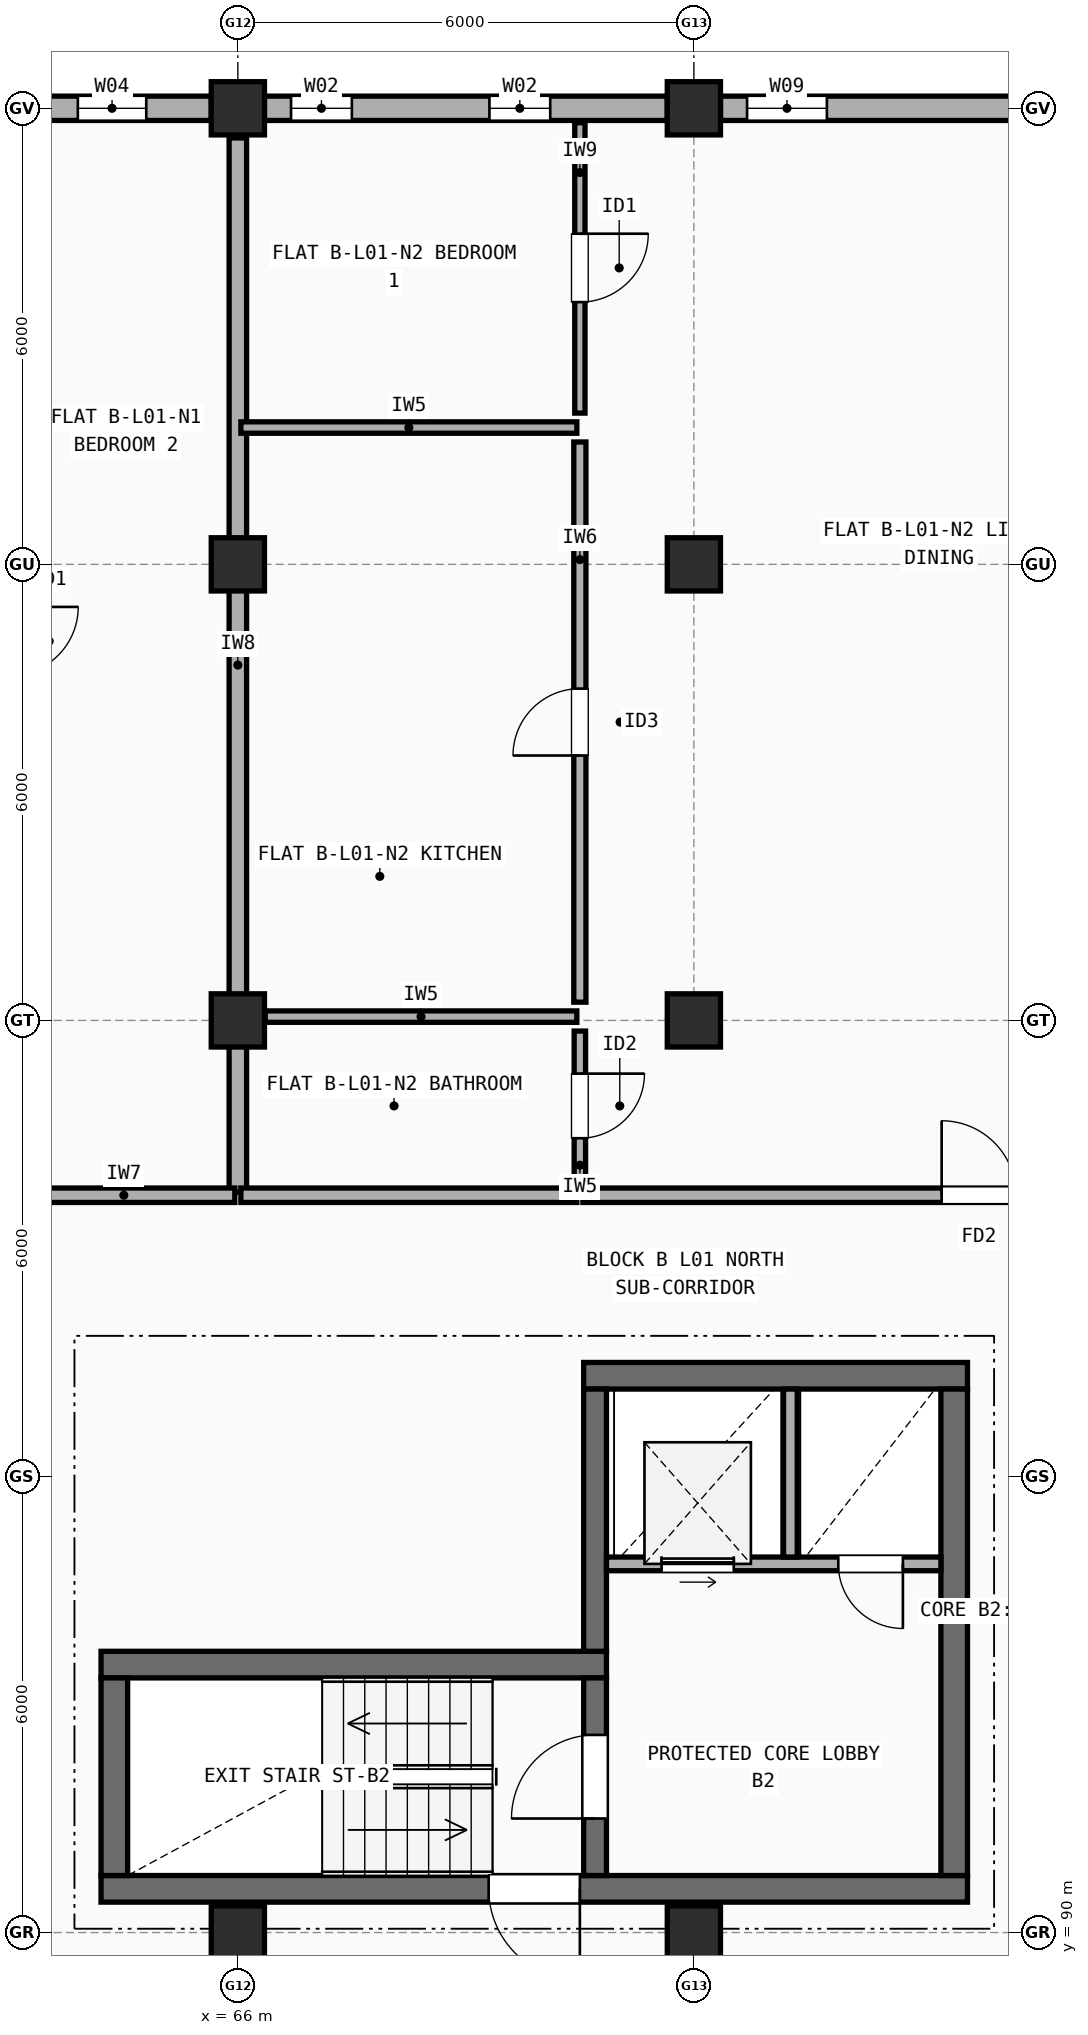
"""IFC4 building model, lengths in metres.
Left out: names, types, materials, properties, quantities, classifications, styles, units other than length and angle.
Written with IfcOpenShell. Run it as: python <this file> out.ifc"""

import sys

from ifc_helpers import new_model, si_unit, direction, frame, frame_2d, origin, origin_2d, place, context, subcontext, project, spatial, rectangle, extrude, element, fill, save


model = new_model("IFC4")
c1 = context("Model", 3, precision=1e-05, world=origin(), true_north=direction((0.0, 1.0)))
c2 = subcontext(c1, "Body", "Model", "MODEL_VIEW")
j1 = project(units=[si_unit("LENGTHUNIT", "METRE"), si_unit("PLANEANGLEUNIT", "RADIAN")], contexts=[c1])
p1 = place(None, origin())
s1 = spatial("IfcSite", under=j1, at=p1, CompositionType="ELEMENT")
p2 = place(p1, origin())
s2 = spatial("IfcBuilding", under=s1, at=p2, CompositionType="ELEMENT")
p3 = place(p2, frame((0.0, 0.0, 4.5)))
s3 = spatial("IfcBuildingStorey", under=s2, at=p3, CompositionType="ELEMENT", Elevation=4.5)
for number, where, z_axis, x_axis in (
    (1, (66.0, 90.0, 0.0), (0.0, 0.0, 1.0), (1.0, 0.0, 0.0)),
    (2, (66.0, 102.0, 0.0), (0.0, 0.0, 1.0), (1.0, 0.0, 0.0)),
    (3, (66.0, 108.0, 0.0), (0.0, 0.0, 1.0), (1.0, 0.0, 0.0)),
    (4, (66.0, 114.0, 0.0), (0.0, 0.0, 1.0), (1.0, 0.0, 0.0)),
    (5, (72.0, 90.0, 0.0), (0.0, 0.0, 1.0), (1.0, 0.0, 0.0)),
    (6, (72.0, 102.0, 0.0), (0.0, 0.0, 1.0), (1.0, 0.0, 0.0)),
    (7, (72.0, 108.0, 0.0), (0.0, 0.0, 1.0), (1.0, 0.0, 0.0)),
    (8, (72.0, 114.0, 0.0), (0.0, 0.0, 1.0), (1.0, 0.0, 0.0)),
):
    element("IfcColumn", number, at=place(p3, frame(where, z_axis=z_axis, x_axis=x_axis)), inside=s3, PredefinedType="COLUMN", context=c2, shape_type="SweptSolid", body=[
        extrude(rectangle(XDim=0.7, YDim=0.7, at=origin_2d()), origin(), (0.0, 0.0, 1.0), 2.945),
    ])
p4 = place(p3, frame((77.7, 114.0, 0.0), z_axis=(0.0, 0.0, 1.0), x_axis=(-1.0, 0.0, 0.0)))
e9 = element("IfcWall", 9, at=p4, inside=s3, PredefinedType="STANDARD", context=c2, shape_type="SweptSolid", body=[
    extrude(rectangle(XDim=5.35, YDim=0.32, at=frame_2d((2.675, 0.0))), origin(), (0.0, 0.0, 1.0), 2.427),
])
p5 = place(p4, frame((0.35, 0.0, 0.9)))
e10 = element("IfcOpeningElement", 10, at=p5, cuts=e9, PredefinedType="OPENING", context=c2, shape_type="SweptSolid", body=[
    extrude(rectangle(XDim=1.05, YDim=1.35, at=frame_2d((0.525, 0.675))), frame((0.0, 0.17, 0.0), z_axis=(0.0, -1.0, 0.0), x_axis=(1.0, 0.0, 0.0)), (0.0, 0.0, 1.0), 0.34),
])
p6 = place(p4, frame((3.95, 0.0, 0.9)))
e11 = element("IfcOpeningElement", 11, at=p6, cuts=e9, PredefinedType="OPENING", context=c2, shape_type="SweptSolid", body=[
    extrude(rectangle(XDim=1.05, YDim=1.35, at=frame_2d((0.525, 0.675))), frame((0.0, 0.17, 0.0), z_axis=(0.0, -1.0, 0.0), x_axis=(1.0, 0.0, 0.0)), (0.0, 0.0, 1.0), 0.34),
])
p7 = place(p3, frame((71.65, 114.0, 0.0), z_axis=(0.0, 0.0, 1.0), x_axis=(-1.0, 0.0, 0.0)))
e12 = element("IfcWall", 12, at=p7, inside=s3, PredefinedType="STANDARD", context=c2, shape_type="SweptSolid", body=[
    extrude(rectangle(XDim=5.3, YDim=0.32, at=frame_2d((2.65, 0.0))), origin(), (0.0, 0.0, 1.0), 2.427),
])
p8 = place(p7, frame((1.54, 0.0, 0.9)))
e13 = element("IfcOpeningElement", 13, at=p8, cuts=e12, PredefinedType="OPENING", context=c2, shape_type="SweptSolid", body=[
    extrude(rectangle(XDim=0.8, YDim=1.2, at=frame_2d((0.4, 0.6))), frame((0.0, 0.17, 0.0), z_axis=(0.0, -1.0, 0.0), x_axis=(1.0, 0.0, 0.0)), (0.0, 0.0, 1.0), 0.34),
])
p9 = place(p7, frame((4.15, 0.0, 0.9)))
e14 = element("IfcOpeningElement", 14, at=p9, cuts=e12, PredefinedType="OPENING", context=c2, shape_type="SweptSolid", body=[
    extrude(rectangle(XDim=0.8, YDim=1.2, at=frame_2d((0.4, 0.6))), frame((0.0, 0.17, 0.0), z_axis=(0.0, -1.0, 0.0), x_axis=(1.0, 0.0, 0.0)), (0.0, 0.0, 1.0), 0.34),
])
p10 = place(p3, frame((65.65, 114.0, 0.0), z_axis=(0.0, 0.0, 1.0), x_axis=(-1.0, 0.0, 0.0)))
e15 = element("IfcWall", 15, at=p10, inside=s3, PredefinedType="STANDARD", context=c2, shape_type="SweptSolid", body=[
    extrude(rectangle(XDim=5.3, YDim=0.32, at=frame_2d((2.65, 0.0))), origin(), (0.0, 0.0, 1.0), 2.427),
])
p11 = place(p10, frame((0.855, 0.0, 0.9)))
e16 = element("IfcOpeningElement", 16, at=p11, cuts=e15, PredefinedType="OPENING", context=c2, shape_type="SweptSolid", body=[
    extrude(rectangle(XDim=0.9, YDim=1.3, at=frame_2d((0.45, 0.65))), frame((0.0, 0.17, 0.0), z_axis=(0.0, -1.0, 0.0), x_axis=(1.0, 0.0, 0.0)), (0.0, 0.0, 1.0), 0.34),
])
p12 = place(p10, frame((3.52, 0.0, 0.9)))
e17 = element("IfcOpeningElement", 17, at=p12, cuts=e15, PredefinedType="OPENING", context=c2, shape_type="SweptSolid", body=[
    extrude(rectangle(XDim=0.95, YDim=1.35, at=frame_2d((0.475, 0.675))), frame((0.0, 0.17, 0.0), z_axis=(0.0, -1.0, 0.0), x_axis=(1.0, 0.0, 0.0)), (0.0, 0.0, 1.0), 0.34),
])
p13 = place(p3, frame((64.2, 90.575, 0.0), z_axis=(0.0, 0.0, 1.0), x_axis=(1.0, 0.0, 0.0)))
e18 = element("IfcWall", 18, at=p13, inside=s3, PredefinedType="SHEAR", context=c2, shape_type="SweptSolid", body=[
    extrude(rectangle(XDim=11.4, YDim=0.35, at=frame_2d((5.7, 0.0))), origin(), (0.0, 0.0, 1.0), 2.945),
])
p14 = place(p13, frame((5.1, 0.0, 0.0)))
e19 = element("IfcOpeningElement", 19, at=p14, cuts=e18, PredefinedType="OPENING", context=c2, shape_type="SweptSolid", body=[
    extrude(rectangle(XDim=1.2, YDim=2.15, at=frame_2d((0.6, 1.075))), frame((0.0, 0.185, 0.0), z_axis=(0.0, -1.0, 0.0), x_axis=(1.0, 0.0, 0.0)), (0.0, 0.0, 1.0), 0.37),
])
p15 = place(p3, frame((70.85, 93.525, 0.0), z_axis=(0.0, 0.0, 1.0), x_axis=(-1.0, 0.0, 0.0)))
e20 = element("IfcWall", 20, at=p15, inside=s3, PredefinedType="SHEAR", context=c2, shape_type="SweptSolid", body=[
    extrude(rectangle(XDim=6.65, YDim=0.35, at=frame_2d((3.325, 0.0))), origin(), (0.0, 0.0, 1.0), 2.945),
])
p16 = place(p3, frame((64.375, 93.35, 0.0), z_axis=(0.0, 0.0, 1.0), x_axis=(0.0, -1.0, 0.0)))
e21 = element("IfcWall", 21, at=p16, inside=s3, PredefinedType="SHEAR", context=c2, shape_type="SweptSolid", body=[
    extrude(rectangle(XDim=2.6, YDim=0.35, at=frame_2d((1.3, 0.0))), origin(), (0.0, 0.0, 1.0), 2.945),
])
p17 = place(p3, frame((70.7, 90.75, 0.0), z_axis=(0.0, 0.0, 1.0), x_axis=(0.0, 1.0, 0.0)))
e22 = element("IfcWall", 22, at=p17, inside=s3, PredefinedType="SHEAR", context=c2, shape_type="SweptSolid", body=[
    extrude(rectangle(XDim=2.6, YDim=0.3, at=frame_2d((1.3, 0.0))), origin(), (0.0, 0.0, 1.0), 2.945),
])
p18 = place(p17, frame((0.75, 0.0, 0.0)))
e23 = element("IfcOpeningElement", 23, at=p18, cuts=e22, PredefinedType="OPENING", context=c2, shape_type="SweptSolid", body=[
    extrude(rectangle(XDim=1.1, YDim=2.15, at=frame_2d((0.55, 1.075))), frame((0.0, 0.16, 0.0), z_axis=(0.0, -1.0, 0.0), x_axis=(1.0, 0.0, 0.0)), (0.0, 0.0, 1.0), 0.32),
])
p19 = place(p3, frame((75.6, 97.325, 0.0), z_axis=(0.0, 0.0, 1.0), x_axis=(-1.0, 0.0, 0.0)))
e24 = element("IfcWall", 24, at=p19, inside=s3, PredefinedType="SHEAR", context=c2, shape_type="SweptSolid", body=[
    extrude(rectangle(XDim=5.05, YDim=0.35, at=frame_2d((2.525, 0.0))), origin(), (0.0, 0.0, 1.0), 2.945),
])
p20 = place(p3, frame((75.425, 90.75, 0.0), z_axis=(0.0, 0.0, 1.0), x_axis=(0.0, 1.0, 0.0)))
e25 = element("IfcWall", 25, at=p20, inside=s3, PredefinedType="SHEAR", context=c2, shape_type="SweptSolid", body=[
    extrude(rectangle(XDim=6.4, YDim=0.35, at=frame_2d((3.2, 0.0))), origin(), (0.0, 0.0, 1.0), 2.945),
])
p21 = place(p3, frame((70.7, 93.7, 0.0), z_axis=(0.0, 0.0, 1.0), x_axis=(0.0, 1.0, 0.0)))
e26 = element("IfcWall", 26, at=p21, inside=s3, PredefinedType="SHEAR", context=c2, shape_type="SweptSolid", body=[
    extrude(rectangle(XDim=3.45, YDim=0.3, at=frame_2d((1.725, 0.0))), origin(), (0.0, 0.0, 1.0), 2.945),
])
p22 = place(p3, frame((70.85, 94.85, 0.0), z_axis=(0.0, 0.0, 1.0), x_axis=(1.0, 0.0, 0.0)))
e27 = element("IfcWall", 27, at=p22, inside=s3, PredefinedType="SOLIDWALL", context=c2, shape_type="SweptSolid", body=[
    extrude(rectangle(XDim=4.4, YDim=0.18, at=frame_2d((2.2, 0.0))), origin(), (0.0, 0.0, 1.0), 2.945),
])
p23 = place(p22, frame((0.725, 0.0, 0.0)))
e28 = element("IfcOpeningElement", 28, at=p23, cuts=e27, PredefinedType="OPENING", context=c2, shape_type="SweptSolid", body=[
    extrude(rectangle(XDim=0.95, YDim=2.15, at=frame_2d((0.475, 1.075))), frame((0.0, 0.1, 0.0), z_axis=(0.0, -1.0, 0.0), x_axis=(1.0, 0.0, 0.0)), (0.0, 0.0, 1.0), 0.2),
])
p24 = place(p22, frame((3.05, 0.0, 0.0)))
e29 = element("IfcOpeningElement", 29, at=p24, cuts=e27, PredefinedType="OPENING", context=c2, shape_type="SweptSolid", body=[
    extrude(rectangle(XDim=0.85, YDim=2.1, at=frame_2d((0.425, 1.05))), frame((0.0, 0.1, 0.0), z_axis=(0.0, -1.0, 0.0), x_axis=(1.0, 0.0, 0.0)), (0.0, 0.0, 1.0), 0.2),
])
p25 = place(p3, frame((73.27, 94.94, 0.0), z_axis=(0.0, 0.0, 1.0), x_axis=(0.0, 1.0, 0.0)))
e30 = element("IfcWall", 30, at=p25, inside=s3, PredefinedType="SOLIDWALL", context=c2, shape_type="SweptSolid", body=[
    extrude(rectangle(XDim=2.21, YDim=0.18, at=frame_2d((1.105, 0.0))), origin(), (0.0, 0.0, 1.0), 2.945),
])
p26 = place(p3, frame((66.0, 99.74, 0.0), z_axis=(0.0, 0.0, 1.0), x_axis=(0.0, 1.0, 0.0)))
e31 = element("IfcWall", 31, at=p26, inside=s3, PredefinedType="SOLIDWALL", context=c2, shape_type="SweptSolid", body=[
    extrude(rectangle(XDim=13.87, YDim=0.23, at=frame_2d((6.935, 0.0))), origin(), (0.0, 0.0, 1.0), 2.327),
])
p27 = place(p3, frame((63.04, 99.7, 0.0), z_axis=(0.0, 0.0, 1.0), x_axis=(1.0, 0.0, 0.0)))
e32 = element("IfcWall", 32, at=p27, inside=s3, PredefinedType="SOLIDWALL", context=c2, shape_type="SweptSolid", body=[
    extrude(rectangle(XDim=2.92, YDim=0.19, at=frame_2d((1.46, 0.0))), origin(), (0.0, 0.0, 1.0), 2.945),
])
p28 = place(p3, frame((66.04, 99.7, 0.0), z_axis=(0.0, 0.0, 1.0), x_axis=(1.0, 0.0, 0.0)))
e33 = element("IfcWall", 33, at=p28, inside=s3, PredefinedType="SOLIDWALL", context=c2, shape_type="SweptSolid", body=[
    extrude(rectangle(XDim=4.42, YDim=0.19, at=frame_2d((2.21, 0.0))), origin(), (0.0, 0.0, 1.0), 2.945),
])
p29 = place(p3, frame((70.54, 99.7, 0.0), z_axis=(0.0, 0.0, 1.0), x_axis=(1.0, 0.0, 0.0)))
e34 = element("IfcWall", 34, at=p29, inside=s3, PredefinedType="SOLIDWALL", context=c2, shape_type="SweptSolid", body=[
    extrude(rectangle(XDim=10.42, YDim=0.19, at=frame_2d((5.21, 0.0))), origin(), (0.0, 0.0, 1.0), 2.427),
])
p30 = place(p29, frame((4.72, 0.0, 0.0)))
e35 = element("IfcOpeningElement", 35, at=p30, cuts=e34, PredefinedType="OPENING", context=c2, shape_type="SweptSolid", body=[
    extrude(rectangle(XDim=0.98, YDim=2.15, at=frame_2d((0.49, 1.075))), frame((0.0, 0.105, 0.0), z_axis=(0.0, -1.0, 0.0), x_axis=(1.0, 0.0, 0.0)), (0.0, 0.0, 1.0), 0.21),
])
p31 = place(p3, frame((70.5, 109.99, 0.0), z_axis=(0.0, 0.0, 1.0), x_axis=(0.0, 1.0, 0.0)))
e36 = element("IfcWall", 36, at=p31, inside=s3, PredefinedType="PARTITIONING", context=c2, shape_type="SweptSolid", body=[
    extrude(rectangle(XDim=3.82, YDim=0.135, at=frame_2d((1.91, 0.0))), origin(), (0.0, 0.0, 1.0), 2.945),
])
p32 = place(p31, frame((1.46, 0.0, 0.0)))
e37 = element("IfcOpeningElement", 37, at=p32, cuts=e36, PredefinedType="OPENING", context=c2, shape_type="SweptSolid", body=[
    extrude(rectangle(XDim=0.9, YDim=2.1, at=frame_2d((0.45, 1.05))), frame((0.0, 0.077, 0.0), z_axis=(0.0, -1.0, 0.0), x_axis=(1.0, 0.0, 0.0)), (0.0, 0.0, 1.0), 0.155),
])
p33 = place(p3, frame((70.5, 102.24, 0.0), z_axis=(0.0, 0.0, 1.0), x_axis=(0.0, 1.0, 0.0)))
e38 = element("IfcWall", 38, at=p33, inside=s3, PredefinedType="PLUMBINGWALL", context=c2, shape_type="SweptSolid", body=[
    extrude(rectangle(XDim=7.37, YDim=0.16, at=frame_2d((3.685, 0.0))), origin(), (0.0, 0.0, 1.0), 2.427),
])
p34 = place(p33, frame((3.245, 0.0, 0.0)))
e39 = element("IfcOpeningElement", 39, at=p34, cuts=e38, PredefinedType="OPENING", context=c2, shape_type="SweptSolid", body=[
    extrude(rectangle(XDim=0.88, YDim=2.1, at=frame_2d((0.44, 1.05))), frame((0.0, 0.09, 0.0), z_axis=(0.0, -1.0, 0.0), x_axis=(1.0, 0.0, 0.0)), (0.0, 0.0, 1.0), 0.18),
])
p35 = place(p3, frame((70.5, 99.89, 0.0), z_axis=(0.0, 0.0, 1.0), x_axis=(0.0, 1.0, 0.0)))
e40 = element("IfcWall", 40, at=p35, inside=s3, PredefinedType="PARTITIONING", context=c2, shape_type="SweptSolid", body=[
    extrude(rectangle(XDim=1.97, YDim=0.15, at=frame_2d((0.985, 0.0))), origin(), (0.0, 0.0, 1.0), 2.945),
])
p36 = place(p35, frame((0.56, 0.0, 0.0)))
e41 = element("IfcOpeningElement", 41, at=p36, cuts=e40, PredefinedType="OPENING", context=c2, shape_type="SweptSolid", body=[
    extrude(rectangle(XDim=0.85, YDim=2.1, at=frame_2d((0.425, 1.05))), frame((0.0, 0.085, 0.0), z_axis=(0.0, -1.0, 0.0), x_axis=(1.0, 0.0, 0.0)), (0.0, 0.0, 1.0), 0.17),
])
p37 = place(p3, frame((66.04, 109.8, 0.0), z_axis=(0.0, 0.0, 1.0), x_axis=(1.0, 0.0, 0.0)))
e42 = element("IfcWall", 42, at=p37, inside=s3, PredefinedType="PARTITIONING", context=c2, shape_type="SweptSolid", body=[
    extrude(rectangle(XDim=4.42, YDim=0.15, at=frame_2d((2.21, 0.0))), origin(), (0.0, 0.0, 1.0), 2.327),
])
p38 = place(p3, frame((66.36, 102.05, 0.0), z_axis=(0.0, 0.0, 1.0), x_axis=(1.0, 0.0, 0.0)))
e43 = element("IfcWall", 43, at=p38, inside=s3, PredefinedType="PARTITIONING", context=c2, shape_type="SweptSolid", body=[
    extrude(rectangle(XDim=4.1, YDim=0.15, at=frame_2d((2.05, 0.0))), origin(), (0.0, 0.0, 1.0), 2.427),
])
p39 = place(p6, origin())
e44 = element("IfcWindow", 44, at=p39, inside=s3, PartitioningType="SINGLE_PANEL", PredefinedType="WINDOW", context=c2, shape_type="SweptSolid", body=[
    extrude(rectangle(XDim=1.05, YDim=1.35, at=frame_2d((0.525, 0.675))), frame((0.0, 0.03, 0.0), z_axis=(0.0, -1.0, 0.0), x_axis=(1.0, 0.0, 0.0)), (0.0, 0.0, 1.0), 0.06),
])
fill(e11, e44)
p40 = place(p8, origin())
e45 = element("IfcWindow", 45, at=p40, inside=s3, PartitioningType="SINGLE_PANEL", PredefinedType="WINDOW", context=c2, shape_type="SweptSolid", body=[
    extrude(rectangle(XDim=0.8, YDim=1.2, at=frame_2d((0.4, 0.6))), frame((0.0, 0.03, 0.0), z_axis=(0.0, -1.0, 0.0), x_axis=(1.0, 0.0, 0.0)), (0.0, 0.0, 1.0), 0.06),
])
fill(e13, e45)
p41 = place(p9, origin())
e46 = element("IfcWindow", 46, at=p41, inside=s3, PartitioningType="SINGLE_PANEL", PredefinedType="WINDOW", context=c2, shape_type="SweptSolid", body=[
    extrude(rectangle(XDim=0.8, YDim=1.2, at=frame_2d((0.4, 0.6))), frame((0.0, 0.03, 0.0), z_axis=(0.0, -1.0, 0.0), x_axis=(1.0, 0.0, 0.0)), (0.0, 0.0, 1.0), 0.06),
])
fill(e14, e46)
p42 = place(p11, origin())
e47 = element("IfcWindow", 47, at=p42, inside=s3, PartitioningType="SINGLE_PANEL", PredefinedType="WINDOW", context=c2, shape_type="SweptSolid", body=[
    extrude(rectangle(XDim=0.9, YDim=1.3, at=frame_2d((0.45, 0.65))), frame((0.0, 0.03, 0.0), z_axis=(0.0, -1.0, 0.0), x_axis=(1.0, 0.0, 0.0)), (0.0, 0.0, 1.0), 0.06),
])
fill(e16, e47)
p43 = place(p14, origin())
e48 = element("IfcDoor", 48, at=p43, inside=s3, OperationType="SINGLE_SWING_RIGHT", PredefinedType="DOOR", context=c2, shape_type="SweptSolid", body=[
    extrude(rectangle(XDim=1.2, YDim=2.15, at=frame_2d((0.6, 1.075))), frame((0.0, 0.025, 0.0), z_axis=(0.0, -1.0, 0.0), x_axis=(1.0, 0.0, 0.0)), (0.0, 0.0, 1.0), 0.05),
])
fill(e19, e48)
p44 = place(p18, origin())
e49 = element("IfcDoor", 49, at=p44, inside=s3, OperationType="SINGLE_SWING_LEFT", PredefinedType="DOOR", context=c2, shape_type="SweptSolid", body=[
    extrude(rectangle(XDim=1.1, YDim=2.15, at=frame_2d((0.55, 1.075))), frame((0.0, 0.025, 0.0), z_axis=(0.0, -1.0, 0.0), x_axis=(1.0, 0.0, 0.0)), (0.0, 0.0, 1.0), 0.05),
])
fill(e23, e49)
p45 = place(p23, origin())
e50 = element("IfcDoor", 50, at=p45, inside=s3, OperationType="SLIDING_TO_LEFT", PredefinedType="DOOR", context=c2, shape_type="SweptSolid", body=[
    extrude(rectangle(XDim=0.95, YDim=2.15, at=frame_2d((0.475, 1.075))), frame((0.0, 0.025, 0.0), z_axis=(0.0, -1.0, 0.0), x_axis=(1.0, 0.0, 0.0)), (0.0, 0.0, 1.0), 0.05),
])
fill(e28, e50)
p46 = place(p24, frame((0.85, 0.0, 0.0), z_axis=(0.0, 0.0, 1.0), x_axis=(-1.0, 0.0, 0.0)))
e51 = element("IfcDoor", 51, at=p46, inside=s3, OperationType="SINGLE_SWING_RIGHT", PredefinedType="DOOR", context=c2, shape_type="SweptSolid", body=[
    extrude(rectangle(XDim=0.85, YDim=2.1, at=frame_2d((0.425, 1.05))), frame((0.0, 0.025, 0.0), z_axis=(0.0, -1.0, 0.0), x_axis=(1.0, 0.0, 0.0)), (0.0, 0.0, 1.0), 0.05),
])
fill(e29, e51)
p47 = place(p30, origin())
e52 = element("IfcDoor", 52, at=p47, inside=s3, OperationType="SINGLE_SWING_LEFT", PredefinedType="DOOR", context=c2, shape_type="SweptSolid", body=[
    extrude(rectangle(XDim=0.98, YDim=2.15, at=frame_2d((0.49, 1.075))), frame((0.0, 0.025, 0.0), z_axis=(0.0, -1.0, 0.0), x_axis=(1.0, 0.0, 0.0)), (0.0, 0.0, 1.0), 0.05),
])
fill(e35, e52)
p48 = place(p32, origin())
e53 = element("IfcDoor", 53, at=p48, inside=s3, OperationType="SINGLE_SWING_RIGHT", PredefinedType="DOOR", context=c2, shape_type="SweptSolid", body=[
    extrude(rectangle(XDim=0.9, YDim=2.1, at=frame_2d((0.45, 1.05))), frame((0.0, 0.025, 0.0), z_axis=(0.0, -1.0, 0.0), x_axis=(1.0, 0.0, 0.0)), (0.0, 0.0, 1.0), 0.05),
])
fill(e37, e53)
p49 = place(p34, origin())
e54 = element("IfcDoor", 54, at=p49, inside=s3, OperationType="SINGLE_SWING_LEFT", PredefinedType="DOOR", context=c2, shape_type="SweptSolid", body=[
    extrude(rectangle(XDim=0.88, YDim=2.1, at=frame_2d((0.44, 1.05))), frame((0.0, 0.025, 0.0), z_axis=(0.0, -1.0, 0.0), x_axis=(1.0, 0.0, 0.0)), (0.0, 0.0, 1.0), 0.05),
])
fill(e39, e54)
p50 = place(p36, origin())
e55 = element("IfcDoor", 55, at=p50, inside=s3, OperationType="SINGLE_SWING_RIGHT", PredefinedType="DOOR", context=c2, shape_type="SweptSolid", body=[
    extrude(rectangle(XDim=0.85, YDim=2.1, at=frame_2d((0.425, 1.05))), frame((0.0, 0.025, 0.0), z_axis=(0.0, -1.0, 0.0), x_axis=(1.0, 0.0, 0.0)), (0.0, 0.0, 1.0), 0.05),
])
fill(e41, e55)
save(model, sys.argv[1])
